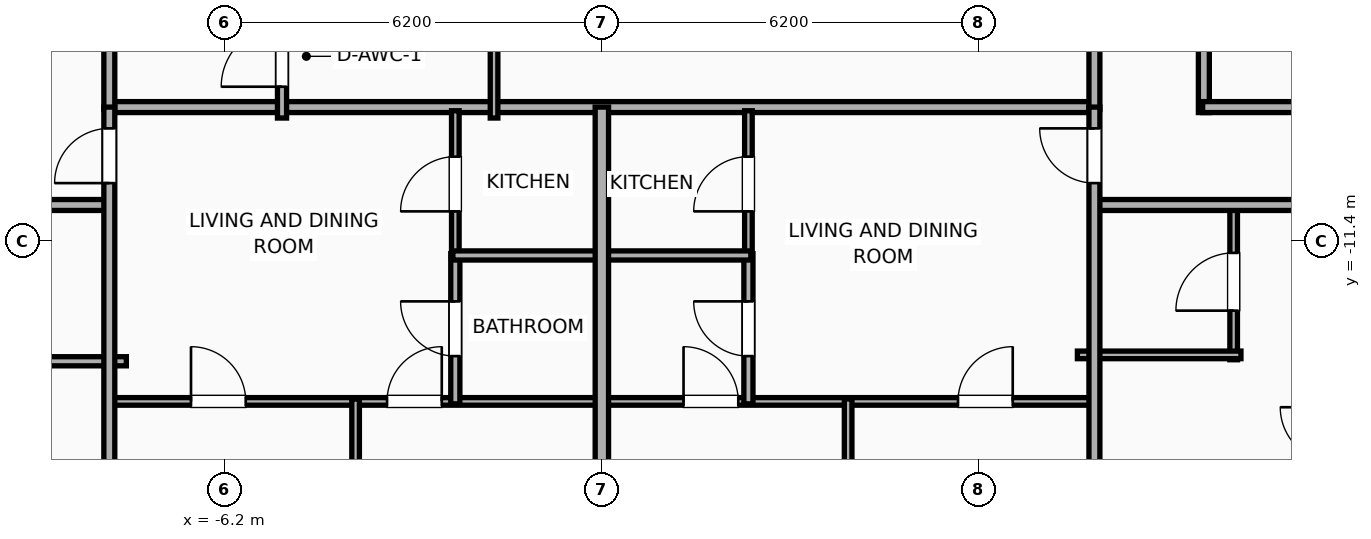
"""IFC4 building model, lengths in metres.
Left out: names, types, materials, properties, quantities, classifications, styles, units other than length and angle.
Written with IfcOpenShell. Run it as: python <this file> out.ifc"""

import sys

from ifc_helpers import new_model, si_unit, direction, frame, frame_2d, origin, place, context, subcontext, project, spatial, rectangle, extrude, element, fill, save


model = new_model("IFC4")
c1 = context("Model", 3, precision=1e-05, world=origin(), true_north=direction((0.0, 1.0)))
c2 = subcontext(c1, "Body", "Model", "MODEL_VIEW")
j1 = project(units=[si_unit("LENGTHUNIT", "METRE"), si_unit("PLANEANGLEUNIT", "RADIAN")], contexts=[c1])
p1 = place(None, origin())
s1 = spatial("IfcSite", under=j1, at=p1, CompositionType="ELEMENT")
p2 = place(p1, origin())
s2 = spatial("IfcBuilding", under=s1, at=p2, CompositionType="ELEMENT")
p3 = place(p2, frame((0.0, 0.0, 215.8)))
s3 = spatial("IfcBuildingStorey", under=s2, at=p3, CompositionType="ELEMENT", Elevation=215.8)
p4 = place(p3, frame((9.9, -9.28, 0.0), z_axis=(0.0, 0.0, 1.0), x_axis=(0.0, 1.0, 0.0)))
e1 = element("IfcWall", 1, at=p4, inside=s3, PredefinedType="PARTITIONING", context=c2, shape_type="SweptSolid", body=[
    extrude(rectangle(XDim=18.56, YDim=0.18, at=frame_2d((9.28, 0.0))), origin(), (0.0, 0.0, 1.0), 3.65),
])
p5 = place(p4, frame((7.802, 0.0, 0.0)))
e2 = element("IfcOpeningElement", 2, at=p5, cuts=e1, PredefinedType="OPENING", context=c2, shape_type="SweptSolid", body=[
    extrude(rectangle(XDim=1.1, YDim=2.05, at=frame_2d((0.55, 1.025))), frame((0.0, 0.1, 0.0), z_axis=(0.0, -1.0, 0.0), x_axis=(1.0, 0.0, 0.0)), (0.0, 0.0, 1.0), 0.2),
])
p6 = place(p3, frame((9.88, -9.19, 0.0), z_axis=(0.0, 0.0, 1.0), x_axis=(1.0, 0.0, 0.0)))
e3 = element("IfcWall", 3, at=p6, inside=s3, PredefinedType="PARTITIONING", context=c2, shape_type="SweptSolid", body=[
    extrude(rectangle(XDim=20.35, YDim=0.18, at=frame_2d((10.175, 0.0))), origin(), (0.0, 0.0, 1.0), 3.65),
])
p7 = place(p3, frame((-8.15, -9.19, 0.0), z_axis=(0.0, 0.0, 1.0), x_axis=(1.0, 0.0, 0.0)))
e4 = element("IfcWall", 4, at=p7, inside=s3, PredefinedType="PARTITIONING", context=c2, shape_type="SweptSolid", body=[
    extrude(rectangle(XDim=16.3, YDim=0.18, at=frame_2d((8.15, 0.0))), origin(), (0.0, 0.0, 1.0), 3.65),
])
p8 = place(p3, frame((-8.1, -9.23, 0.0), z_axis=(0.0, 0.0, 1.0), x_axis=(0.0, 1.0, 0.0)))
e5 = element("IfcWall", 5, at=p8, inside=s3, PredefinedType="PARTITIONING", context=c2, shape_type="SweptSolid", body=[
    extrude(rectangle(XDim=18.46, YDim=0.18, at=frame_2d((9.23, 0.0))), origin(), (0.0, 0.0, 1.0), 3.65),
])
p9 = place(p8, frame((1.346, 0.0, 0.0)))
e6 = element("IfcOpeningElement", 6, at=p9, cuts=e5, PredefinedType="OPENING", context=c2, shape_type="SweptSolid", body=[
    extrude(rectangle(XDim=1.0, YDim=2.05, at=frame_2d((0.5, 1.025))), frame((0.0, 0.1, 0.0), z_axis=(0.0, -1.0, 0.0), x_axis=(1.0, 0.0, 0.0)), (0.0, 0.0, 1.0), 0.2),
])
p10 = place(p8, frame((10.601, 0.0, 0.0)))
e7 = element("IfcOpeningElement", 7, at=p10, cuts=e5, PredefinedType="OPENING", context=c2, shape_type="SweptSolid", body=[
    extrude(rectangle(XDim=0.95, YDim=2.05, at=frame_2d((0.475, 1.025))), frame((0.0, 0.1, 0.0), z_axis=(0.0, -1.0, 0.0), x_axis=(1.0, 0.0, 0.0)), (0.0, 0.0, 1.0), 0.2),
])
p11 = place(p3, frame((8.1, -9.23, 0.0), z_axis=(0.0, 0.0, 1.0), x_axis=(0.0, 1.0, 0.0)))
e8 = element("IfcWall", 8, at=p11, inside=s3, PredefinedType="PARTITIONING", context=c2, shape_type="SweptSolid", body=[
    extrude(rectangle(XDim=18.46, YDim=0.18, at=frame_2d((9.23, 0.0))), origin(), (0.0, 0.0, 1.0), 3.65),
])
p12 = place(p3, frame((-5.26, -9.37, 0.0), z_axis=(0.0, 0.0, 1.0), x_axis=(0.0, 1.0, 0.0)))
e9 = element("IfcWall", 9, at=p12, inside=s3, PredefinedType="PLUMBINGWALL", context=c2, shape_type="SweptSolid", body=[
    extrude(rectangle(XDim=3.35, YDim=0.15, at=frame_2d((1.675, 0.0))), origin(), (0.0, 0.0, 1.0), 3.65),
])
p13 = place(p12, frame((0.515, 0.0, 0.0)))
e10 = element("IfcOpeningElement", 10, at=p13, cuts=e9, PredefinedType="OPENING", context=c2, shape_type="SweptSolid", body=[
    extrude(rectangle(XDim=1.0, YDim=2.05, at=frame_2d((0.5, 1.025))), frame((0.0, 0.085, 0.0), z_axis=(0.0, -1.0, 0.0), x_axis=(1.0, 0.0, 0.0)), (0.0, 0.0, 1.0), 0.17),
])
p14 = place(p3, frame((-1.773, -9.37, 0.0), z_axis=(0.0, 0.0, 1.0), x_axis=(0.0, 1.0, 0.0)))
e11 = element("IfcWall", 11, at=p14, inside=s3, PredefinedType="PARTITIONING", context=c2, shape_type="SweptSolid", body=[
    extrude(rectangle(XDim=18.69, YDim=0.125, at=frame_2d((9.345, 0.0))), origin(), (0.0, 0.0, 1.0), 3.65),
])
p15 = place(p14, frame((8.87, 0.0, 0.0)))
e12 = element("IfcOpeningElement", 12, at=p15, cuts=e11, PredefinedType="OPENING", context=c2, shape_type="SweptSolid", body=[
    extrude(rectangle(XDim=0.95, YDim=2.05, at=frame_2d((0.475, 1.025))), frame((0.0, 0.073, 0.0), z_axis=(0.0, -1.0, 0.0), x_axis=(1.0, 0.0, 0.0)), (0.0, 0.0, 1.0), 0.145),
])
p16 = place(p3, frame((-10.217, -13.37, 0.0), z_axis=(0.0, 0.0, 1.0), x_axis=(1.0, 0.0, 0.0)))
e13 = element("IfcWall", 13, at=p16, inside=s3, PredefinedType="PLUMBINGWALL", context=c2, shape_type="SweptSolid", body=[
    extrude(rectangle(XDim=2.397, YDim=0.15, at=frame_2d((1.198, 0.0))), origin(), (0.0, 0.0, 1.0), 3.65),
])
p17 = place(p3, frame((10.39, -13.345, 0.0), z_axis=(0.0, 0.0, 1.0), x_axis=(0.0, 1.0, 0.0)))
e14 = element("IfcWall", 14, at=p17, inside=s3, PredefinedType="PARTITIONING", context=c2, shape_type="SweptSolid", body=[
    extrude(rectangle(XDim=2.565, YDim=0.125, at=frame_2d((1.282, 0.0))), origin(), (0.0, 0.0, 1.0), 3.65),
])
p18 = place(p17, frame((0.808, 0.0, 0.0)))
e15 = element("IfcOpeningElement", 15, at=p18, cuts=e14, PredefinedType="OPENING", context=c2, shape_type="SweptSolid", body=[
    extrude(rectangle(XDim=0.95, YDim=2.05, at=frame_2d((0.475, 1.025))), frame((0.0, 0.073, 0.0), z_axis=(0.0, -1.0, 0.0), x_axis=(1.0, 0.0, 0.0)), (0.0, 0.0, 1.0), 0.145),
])
p19 = place(p3, frame((7.82, -13.265, 0.0), z_axis=(0.0, 0.0, 1.0), x_axis=(1.0, 0.0, 0.0)))
e16 = element("IfcWall", 16, at=p19, inside=s3, PredefinedType="PARTITIONING", context=c2, shape_type="SweptSolid", body=[
    extrude(rectangle(XDim=2.69, YDim=0.125, at=frame_2d((1.345, 0.0))), origin(), (0.0, 0.0, 1.0), 3.65),
])
p20 = place(p3, frame((-26.23, -10.8, 0.0), z_axis=(0.0, 0.0, 1.0), x_axis=(1.0, 0.0, 0.0)))
e17 = element("IfcWall", 17, at=p20, inside=s3, PredefinedType="PARTITIONING", context=c2, shape_type="SweptSolid", body=[
    extrude(rectangle(XDim=18.15, YDim=0.18, at=frame_2d((9.075, 0.0))), origin(), (0.0, 0.0, 1.0), 3.65),
])
p21 = place(p20, frame((2.659, 0.0, 0.0)))
e18 = element("IfcOpeningElement", 18, at=p21, cuts=e17, PredefinedType="OPENING", context=c2, shape_type="SweptSolid", body=[
    extrude(rectangle(XDim=0.9, YDim=2.05, at=frame_2d((0.45, 1.025))), frame((0.0, 0.1, 0.0), z_axis=(0.0, -1.0, 0.0), x_axis=(1.0, 0.0, 0.0)), (0.0, 0.0, 1.0), 0.2),
])
p22 = place(p20, frame((9.754, 0.0, 0.0)))
e19 = element("IfcOpeningElement", 19, at=p22, cuts=e17, PredefinedType="OPENING", context=c2, shape_type="SweptSolid", body=[
    extrude(rectangle(XDim=1.15, YDim=2.05, at=frame_2d((0.575, 1.025))), frame((0.0, 0.1, 0.0), z_axis=(0.0, -1.0, 0.0), x_axis=(1.0, 0.0, 0.0)), (0.0, 0.0, 1.0), 0.2),
])
p23 = place(p20, frame((14.792, 0.0, 0.0)))
e20 = element("IfcOpeningElement", 20, at=p23, cuts=e17, PredefinedType="OPENING", context=c2, shape_type="SweptSolid", body=[
    extrude(rectangle(XDim=0.9, YDim=2.05, at=frame_2d((0.45, 1.025))), frame((0.0, 0.1, 0.0), z_axis=(0.0, -1.0, 0.0), x_axis=(1.0, 0.0, 0.0)), (0.0, 0.0, 1.0), 0.2),
])
p24 = place(p3, frame((8.08, -10.8, 0.0), z_axis=(0.0, 0.0, 1.0), x_axis=(1.0, 0.0, 0.0)))
e21 = element("IfcWall", 21, at=p24, inside=s3, PredefinedType="PARTITIONING", context=c2, shape_type="SweptSolid", body=[
    extrude(rectangle(XDim=22.15, YDim=0.18, at=frame_2d((11.075, 0.0))), origin(), (0.0, 0.0, 1.0), 3.65),
])
p25 = place(p24, frame((3.283, 0.0, 0.0)))
e22 = element("IfcOpeningElement", 22, at=p25, cuts=e21, PredefinedType="OPENING", context=c2, shape_type="SweptSolid", body=[
    extrude(rectangle(XDim=1.15, YDim=2.05, at=frame_2d((0.575, 1.025))), frame((0.0, 0.1, 0.0), z_axis=(0.0, -1.0, 0.0), x_axis=(1.0, 0.0, 0.0)), (0.0, 0.0, 1.0), 0.2),
])
p26 = place(p24, frame((9.229, 0.0, 0.0)))
e23 = element("IfcOpeningElement", 23, at=p26, cuts=e21, PredefinedType="OPENING", context=c2, shape_type="SweptSolid", body=[
    extrude(rectangle(XDim=1.15, YDim=2.05, at=frame_2d((0.575, 1.025))), frame((0.0, 0.1, 0.0), z_axis=(0.0, -1.0, 0.0), x_axis=(1.0, 0.0, 0.0)), (0.0, 0.0, 1.0), 0.2),
])
p27 = place(p24, frame((18.084, 0.0, 0.0)))
e24 = element("IfcOpeningElement", 24, at=p27, cuts=e21, PredefinedType="OPENING", context=c2, shape_type="SweptSolid", body=[
    extrude(rectangle(XDim=1.15, YDim=2.05, at=frame_2d((0.575, 1.025))), frame((0.0, 0.1, 0.0), z_axis=(0.0, -1.0, 0.0), x_axis=(1.0, 0.0, 0.0)), (0.0, 0.0, 1.0), 0.2),
])
p28 = place(p3, frame((-8.08, -14.03, 0.0), z_axis=(0.0, 0.0, 1.0), x_axis=(1.0, 0.0, 0.0)))
e25 = element("IfcWall", 25, at=p28, inside=s3, PredefinedType="PARTITIONING", context=c2, shape_type="SweptSolid", body=[
    extrude(rectangle(XDim=8.06, YDim=0.125, at=frame_2d((4.03, 0.0))), origin(), (0.0, 0.0, 1.0), 3.65),
])
p29 = place(p28, frame((1.323, 0.0, 0.0)))
e26 = element("IfcOpeningElement", 26, at=p29, cuts=e25, PredefinedType="OPENING", context=c2, shape_type="SweptSolid", body=[
    extrude(rectangle(XDim=0.9, YDim=2.05, at=frame_2d((0.45, 1.025))), frame((0.0, 0.073, 0.0), z_axis=(0.0, -1.0, 0.0), x_axis=(1.0, 0.0, 0.0)), (0.0, 0.0, 1.0), 0.145),
])
p30 = place(p28, frame((4.547, 0.0, 0.0)))
e27 = element("IfcOpeningElement", 27, at=p30, cuts=e25, PredefinedType="OPENING", context=c2, shape_type="SweptSolid", body=[
    extrude(rectangle(XDim=0.9, YDim=2.05, at=frame_2d((0.45, 1.025))), frame((0.0, 0.073, 0.0), z_axis=(0.0, -1.0, 0.0), x_axis=(1.0, 0.0, 0.0)), (0.0, 0.0, 1.0), 0.145),
])
p31 = place(p3, frame((-2.41, -11.66, 0.0), z_axis=(0.0, 0.0, 1.0), x_axis=(0.0, 1.0, 0.0)))
e28 = element("IfcWall", 28, at=p31, inside=s3, PredefinedType="PARTITIONING", context=c2, shape_type="SweptSolid", body=[
    extrude(rectangle(XDim=2.41, YDim=0.125, at=frame_2d((1.205, 0.0))), origin(), (0.0, 0.0, 1.0), 3.65),
])
p32 = place(p31, frame((0.755, 0.0, 0.0)))
e29 = element("IfcOpeningElement", 29, at=p32, cuts=e28, PredefinedType="OPENING", context=c2, shape_type="SweptSolid", body=[
    extrude(rectangle(XDim=0.9, YDim=2.05, at=frame_2d((0.45, 1.025))), frame((0.0, 0.073, 0.0), z_axis=(0.0, -1.0, 0.0), x_axis=(1.0, 0.0, 0.0)), (0.0, 0.0, 1.0), 0.145),
])
p33 = place(p3, frame((-2.41, -14.07, 0.0), z_axis=(0.0, 0.0, 1.0), x_axis=(0.0, 1.0, 0.0)))
e30 = element("IfcWall", 30, at=p33, inside=s3, PredefinedType="PLUMBINGWALL", context=c2, shape_type="SweptSolid", body=[
    extrude(rectangle(XDim=2.47, YDim=0.15, at=frame_2d((1.235, 0.0))), origin(), (0.0, 0.0, 1.0), 3.65),
])
p34 = place(p33, frame((0.785, 0.0, 0.0)))
e31 = element("IfcOpeningElement", 31, at=p34, cuts=e30, PredefinedType="OPENING", context=c2, shape_type="SweptSolid", body=[
    extrude(rectangle(XDim=0.9, YDim=2.05, at=frame_2d((0.45, 1.025))), frame((0.0, 0.085, 0.0), z_axis=(0.0, -1.0, 0.0), x_axis=(1.0, 0.0, 0.0)), (0.0, 0.0, 1.0), 0.17),
])
p35 = place(p3, frame((-2.45, -11.63, 0.0), z_axis=(0.0, 0.0, 1.0), x_axis=(1.0, 0.0, 0.0)))
e32 = element("IfcWall", 32, at=p35, inside=s3, PredefinedType="PLUMBINGWALL", context=c2, shape_type="SweptSolid", body=[
    extrude(rectangle(XDim=2.43, YDim=0.15, at=frame_2d((1.215, 0.0))), origin(), (0.0, 0.0, 1.0), 3.65),
])
p36 = place(p3, frame((-4.05, -18.83, 0.0), z_axis=(0.0, 0.0, 1.0), x_axis=(0.0, 1.0, 0.0)))
e33 = element("IfcWall", 33, at=p36, inside=s3, PredefinedType="PARTITIONING", context=c2, shape_type="SweptSolid", body=[
    extrude(rectangle(XDim=4.84, YDim=0.125, at=frame_2d((2.42, 0.0))), origin(), (0.0, 0.0, 1.0), 3.65),
])
p37 = place(p3, frame((-8.1, -18.83, 0.0), z_axis=(0.0, 0.0, 1.0), x_axis=(0.0, 1.0, 0.0)))
e34 = element("IfcWall", 34, at=p37, inside=s3, PredefinedType="PARTITIONING", context=c2, shape_type="SweptSolid", body=[
    extrude(rectangle(XDim=9.64, YDim=0.18, at=frame_2d((4.82, 0.0))), origin(), (0.0, 0.0, 1.0), 3.65),
])
p38 = place(p37, frame((8.39, 0.0, 0.0)))
e35 = element("IfcOpeningElement", 35, at=p38, cuts=e34, PredefinedType="OPENING", context=c2, shape_type="SweptSolid", body=[
    extrude(rectangle(XDim=0.9, YDim=2.05, at=frame_2d((0.45, 1.025))), frame((0.0, 0.1, 0.0), z_axis=(0.0, -1.0, 0.0), x_axis=(1.0, 0.0, 0.0)), (0.0, 0.0, 1.0), 0.2),
])
p39 = place(p3, frame((0.02, -14.03, 0.0), z_axis=(0.0, 0.0, 1.0), x_axis=(1.0, 0.0, 0.0)))
e36 = element("IfcWall", 36, at=p39, inside=s3, PredefinedType="PARTITIONING", context=c2, shape_type="SweptSolid", body=[
    extrude(rectangle(XDim=8.06, YDim=0.125, at=frame_2d((4.03, 0.0))), origin(), (0.0, 0.0, 1.0), 3.65),
])
p40 = place(p39, frame((1.323, 0.0, 0.0)))
e37 = element("IfcOpeningElement", 37, at=p40, cuts=e36, PredefinedType="OPENING", context=c2, shape_type="SweptSolid", body=[
    extrude(rectangle(XDim=0.9, YDim=2.05, at=frame_2d((0.45, 1.025))), frame((0.0, 0.073, 0.0), z_axis=(0.0, -1.0, 0.0), x_axis=(1.0, 0.0, 0.0)), (0.0, 0.0, 1.0), 0.145),
])
p41 = place(p39, frame((5.837, 0.0, 0.0)))
e38 = element("IfcOpeningElement", 38, at=p41, cuts=e36, PredefinedType="OPENING", context=c2, shape_type="SweptSolid", body=[
    extrude(rectangle(XDim=0.9, YDim=2.05, at=frame_2d((0.45, 1.025))), frame((0.0, 0.073, 0.0), z_axis=(0.0, -1.0, 0.0), x_axis=(1.0, 0.0, 0.0)), (0.0, 0.0, 1.0), 0.145),
])
p42 = place(p3, frame((2.41, -11.66, 0.0), z_axis=(0.0, 0.0, 1.0), x_axis=(0.0, 1.0, 0.0)))
e39 = element("IfcWall", 39, at=p42, inside=s3, PredefinedType="PARTITIONING", context=c2, shape_type="SweptSolid", body=[
    extrude(rectangle(XDim=2.41, YDim=0.125, at=frame_2d((1.205, 0.0))), origin(), (0.0, 0.0, 1.0), 3.65),
])
p43 = place(p42, frame((0.755, 0.0, 0.0)))
e40 = element("IfcOpeningElement", 40, at=p43, cuts=e39, PredefinedType="OPENING", context=c2, shape_type="SweptSolid", body=[
    extrude(rectangle(XDim=0.9, YDim=2.05, at=frame_2d((0.45, 1.025))), frame((0.0, 0.073, 0.0), z_axis=(0.0, -1.0, 0.0), x_axis=(1.0, 0.0, 0.0)), (0.0, 0.0, 1.0), 0.145),
])
p44 = place(p3, frame((2.41, -14.07, 0.0), z_axis=(0.0, 0.0, 1.0), x_axis=(0.0, 1.0, 0.0)))
e41 = element("IfcWall", 41, at=p44, inside=s3, PredefinedType="PLUMBINGWALL", context=c2, shape_type="SweptSolid", body=[
    extrude(rectangle(XDim=2.47, YDim=0.15, at=frame_2d((1.235, 0.0))), origin(), (0.0, 0.0, 1.0), 3.65),
])
p45 = place(p44, frame((0.785, 0.0, 0.0)))
e42 = element("IfcOpeningElement", 42, at=p45, cuts=e41, PredefinedType="OPENING", context=c2, shape_type="SweptSolid", body=[
    extrude(rectangle(XDim=0.9, YDim=2.05, at=frame_2d((0.45, 1.025))), frame((0.0, 0.085, 0.0), z_axis=(0.0, -1.0, 0.0), x_axis=(1.0, 0.0, 0.0)), (0.0, 0.0, 1.0), 0.17),
])
p46 = place(p3, frame((0.02, -11.63, 0.0), z_axis=(0.0, 0.0, 1.0), x_axis=(1.0, 0.0, 0.0)))
e43 = element("IfcWall", 43, at=p46, inside=s3, PredefinedType="PLUMBINGWALL", context=c2, shape_type="SweptSolid", body=[
    extrude(rectangle(XDim=2.43, YDim=0.15, at=frame_2d((1.215, 0.0))), origin(), (0.0, 0.0, 1.0), 3.65),
])
p47 = place(p3, frame((4.05, -18.83, 0.0), z_axis=(0.0, 0.0, 1.0), x_axis=(0.0, 1.0, 0.0)))
e44 = element("IfcWall", 44, at=p47, inside=s3, PredefinedType="PARTITIONING", context=c2, shape_type="SweptSolid", body=[
    extrude(rectangle(XDim=4.84, YDim=0.125, at=frame_2d((2.42, 0.0))), origin(), (0.0, 0.0, 1.0), 3.65),
])
p48 = place(p3, frame((8.1, -18.83, 0.0), z_axis=(0.0, 0.0, 1.0), x_axis=(0.0, 1.0, 0.0)))
e45 = element("IfcWall", 45, at=p48, inside=s3, PredefinedType="PARTITIONING", context=c2, shape_type="SweptSolid", body=[
    extrude(rectangle(XDim=9.64, YDim=0.18, at=frame_2d((4.82, 0.0))), origin(), (0.0, 0.0, 1.0), 3.65),
])
p49 = place(p48, frame((8.39, 0.0, 0.0)))
e46 = element("IfcOpeningElement", 46, at=p49, cuts=e45, PredefinedType="OPENING", context=c2, shape_type="SweptSolid", body=[
    extrude(rectangle(XDim=0.9, YDim=2.05, at=frame_2d((0.45, 1.025))), frame((0.0, 0.1, 0.0), z_axis=(0.0, -1.0, 0.0), x_axis=(1.0, 0.0, 0.0)), (0.0, 0.0, 1.0), 0.2),
])
p50 = place(p3, frame((0.0, -18.83, 0.0), z_axis=(0.0, 0.0, 1.0), x_axis=(0.0, 1.0, 0.0)))
e47 = element("IfcWall", 47, at=p50, inside=s3, PredefinedType="PARTITIONING", context=c2, shape_type="SweptSolid", body=[
    extrude(rectangle(XDim=9.64, YDim=0.22, at=frame_2d((4.82, 0.0))), origin(), (0.0, 0.0, 1.0), 3.65),
])
p51 = place(p13, origin())
e48 = element("IfcDoor", 48, at=p51, inside=s3, OperationType="SINGLE_SWING_LEFT", PredefinedType="DOOR", context=c2, shape_type="SweptSolid", body=[
    extrude(rectangle(XDim=1.0, YDim=2.05, at=frame_2d((0.5, 1.025))), frame((0.0, 0.025, 0.0), z_axis=(0.0, -1.0, 0.0), x_axis=(1.0, 0.0, 0.0)), (0.0, 0.0, 1.0), 0.05),
])
fill(e10, e48)
p52 = place(p18, origin())
e49 = element("IfcDoor", 49, at=p52, inside=s3, OperationType="SINGLE_SWING_LEFT", PredefinedType="DOOR", context=c2, shape_type="SweptSolid", body=[
    extrude(rectangle(XDim=0.95, YDim=2.05, at=frame_2d((0.475, 1.025))), frame((0.0, 0.025, 0.0), z_axis=(0.0, -1.0, 0.0), x_axis=(1.0, 0.0, 0.0)), (0.0, 0.0, 1.0), 0.05),
])
fill(e15, e49)
p53 = place(p29, origin())
e50 = element("IfcDoor", 50, at=p53, inside=s3, OperationType="SINGLE_SWING_LEFT", PredefinedType="DOOR", context=c2, shape_type="SweptSolid", body=[
    extrude(rectangle(XDim=0.9, YDim=2.05, at=frame_2d((0.45, 1.025))), frame((0.0, 0.025, 0.0), z_axis=(0.0, -1.0, 0.0), x_axis=(1.0, 0.0, 0.0)), (0.0, 0.0, 1.0), 0.05),
])
fill(e26, e50)
p54 = place(p30, origin())
e51 = element("IfcDoor", 51, at=p54, inside=s3, OperationType="SINGLE_SWING_RIGHT", PredefinedType="DOOR", context=c2, shape_type="SweptSolid", body=[
    extrude(rectangle(XDim=0.9, YDim=2.05, at=frame_2d((0.45, 1.025))), frame((0.0, 0.025, 0.0), z_axis=(0.0, -1.0, 0.0), x_axis=(1.0, 0.0, 0.0)), (0.0, 0.0, 1.0), 0.05),
])
fill(e27, e51)
p55 = place(p32, origin())
e52 = element("IfcDoor", 52, at=p55, inside=s3, OperationType="SINGLE_SWING_LEFT", PredefinedType="DOOR", context=c2, shape_type="SweptSolid", body=[
    extrude(rectangle(XDim=0.9, YDim=2.05, at=frame_2d((0.45, 1.025))), frame((0.0, 0.025, 0.0), z_axis=(0.0, -1.0, 0.0), x_axis=(1.0, 0.0, 0.0)), (0.0, 0.0, 1.0), 0.05),
])
fill(e29, e52)
p56 = place(p34, origin())
e53 = element("IfcDoor", 53, at=p56, inside=s3, OperationType="SINGLE_SWING_RIGHT", PredefinedType="DOOR", context=c2, shape_type="SweptSolid", body=[
    extrude(rectangle(XDim=0.9, YDim=2.05, at=frame_2d((0.45, 1.025))), frame((0.0, 0.025, 0.0), z_axis=(0.0, -1.0, 0.0), x_axis=(1.0, 0.0, 0.0)), (0.0, 0.0, 1.0), 0.05),
])
fill(e31, e53)
p57 = place(p38, origin())
e54 = element("IfcDoor", 54, at=p57, inside=s3, OperationType="SINGLE_SWING_LEFT", PredefinedType="DOOR", context=c2, shape_type="SweptSolid", body=[
    extrude(rectangle(XDim=0.9, YDim=2.05, at=frame_2d((0.45, 1.025))), frame((0.0, 0.025, 0.0), z_axis=(0.0, -1.0, 0.0), x_axis=(1.0, 0.0, 0.0)), (0.0, 0.0, 1.0), 0.05),
])
fill(e35, e54)
p58 = place(p40, origin())
e55 = element("IfcDoor", 55, at=p58, inside=s3, OperationType="SINGLE_SWING_LEFT", PredefinedType="DOOR", context=c2, shape_type="SweptSolid", body=[
    extrude(rectangle(XDim=0.9, YDim=2.05, at=frame_2d((0.45, 1.025))), frame((0.0, 0.025, 0.0), z_axis=(0.0, -1.0, 0.0), x_axis=(1.0, 0.0, 0.0)), (0.0, 0.0, 1.0), 0.05),
])
fill(e37, e55)
p59 = place(p41, origin())
e56 = element("IfcDoor", 56, at=p59, inside=s3, OperationType="SINGLE_SWING_RIGHT", PredefinedType="DOOR", context=c2, shape_type="SweptSolid", body=[
    extrude(rectangle(XDim=0.9, YDim=2.05, at=frame_2d((0.45, 1.025))), frame((0.0, 0.025, 0.0), z_axis=(0.0, -1.0, 0.0), x_axis=(1.0, 0.0, 0.0)), (0.0, 0.0, 1.0), 0.05),
])
fill(e38, e56)
p60 = place(p43, origin())
e57 = element("IfcDoor", 57, at=p60, inside=s3, OperationType="SINGLE_SWING_LEFT", PredefinedType="DOOR", context=c2, shape_type="SweptSolid", body=[
    extrude(rectangle(XDim=0.9, YDim=2.05, at=frame_2d((0.45, 1.025))), frame((0.0, 0.025, 0.0), z_axis=(0.0, -1.0, 0.0), x_axis=(1.0, 0.0, 0.0)), (0.0, 0.0, 1.0), 0.05),
])
fill(e40, e57)
p61 = place(p45, origin())
e58 = element("IfcDoor", 58, at=p61, inside=s3, OperationType="SINGLE_SWING_RIGHT", PredefinedType="DOOR", context=c2, shape_type="SweptSolid", body=[
    extrude(rectangle(XDim=0.9, YDim=2.05, at=frame_2d((0.45, 1.025))), frame((0.0, 0.025, 0.0), z_axis=(0.0, -1.0, 0.0), x_axis=(1.0, 0.0, 0.0)), (0.0, 0.0, 1.0), 0.05),
])
fill(e42, e58)
p62 = place(p49, origin())
e59 = element("IfcDoor", 59, at=p62, inside=s3, OperationType="SINGLE_SWING_RIGHT", PredefinedType="DOOR", context=c2, shape_type="SweptSolid", body=[
    extrude(rectangle(XDim=0.9, YDim=2.05, at=frame_2d((0.45, 1.025))), frame((0.0, 0.025, 0.0), z_axis=(0.0, -1.0, 0.0), x_axis=(1.0, 0.0, 0.0)), (0.0, 0.0, 1.0), 0.05),
])
fill(e46, e59)
save(model, sys.argv[1])
